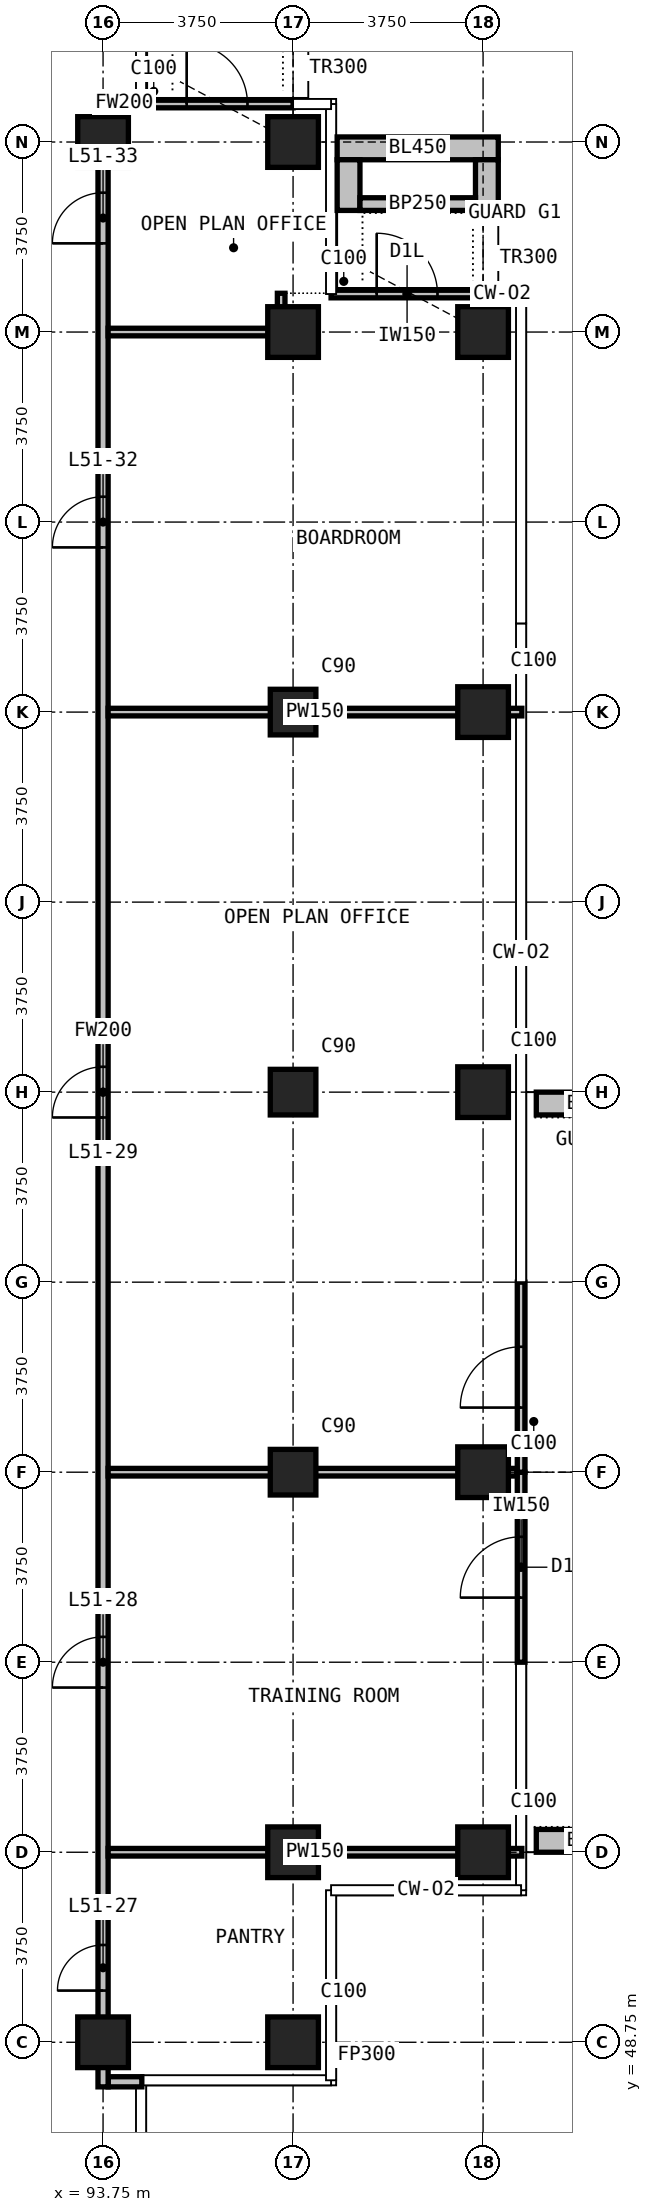
"""IFC4 building model, lengths in metres.
Left out: names, types, materials, properties, quantities, classifications, styles, units other than length and angle.
Written with IfcOpenShell. Run it as: python <this file> out.ifc"""

import sys

from ifc_helpers import new_model, si_unit, direction, frame, frame_2d, origin, origin_2d, place, context, subcontext, project, spatial, rectangle, extrude, element, fill, save


model = new_model("IFC4")
c1 = context("Model", 3, precision=1e-05, world=origin(), true_north=direction((0.0, 1.0)))
c2 = subcontext(c1, "Body", "Model", "MODEL_VIEW")
j1 = project(units=[si_unit("LENGTHUNIT", "METRE"), si_unit("PLANEANGLEUNIT", "RADIAN")], contexts=[c1])
p1 = place(None, origin())
s1 = spatial("IfcSite", under=j1, at=p1, CompositionType="ELEMENT")
p2 = place(p1, origin())
s2 = spatial("IfcBuilding", under=s1, at=p2, CompositionType="ELEMENT")
p3 = place(p2, frame((0.0, 0.0, 199.5)))
s3 = spatial("IfcBuildingStorey", under=s2, at=p3, CompositionType="ELEMENT", Elevation=199.5)
for number, where, z_axis, x_axis in (
    (1, (93.75, 48.75, 0.0), (0.0, 0.0, 1.0), (1.0, 0.0, 0.0)),
    (2, (93.75, 86.25, 0.0), (0.0, 0.0, 1.0), (1.0, 0.0, 0.0)),
    (3, (97.5, 48.75, 0.0), (0.0, 0.0, 1.0), (1.0, 0.0, 0.0)),
    (4, (97.5, 52.5, 0.0), (0.0, 0.0, 1.0), (1.0, 0.0, 0.0)),
):
    element("IfcColumn", number, at=place(p3, frame(where, z_axis=z_axis, x_axis=x_axis)), inside=s3, PredefinedType="COLUMN", context=c2, shape_type="SweptSolid", body=[
        extrude(rectangle(XDim=1.0, YDim=1.0, at=origin_2d()), origin(), (0.0, 0.0, 1.0), 3.6),
    ])
for number, where, z_axis, x_axis in (
    (5, (97.5, 60.0, 0.0), (0.0, 0.0, 1.0), (1.0, 0.0, 0.0)),
    (6, (97.5, 67.5, 0.0), (0.0, 0.0, 1.0), (1.0, 0.0, 0.0)),
    (7, (97.5, 75.0, 0.0), (0.0, 0.0, 1.0), (1.0, 0.0, 0.0)),
):
    element("IfcColumn", number, at=place(p3, frame(where, z_axis=z_axis, x_axis=x_axis)), inside=s3, PredefinedType="COLUMN", context=c2, shape_type="SweptSolid", body=[
        extrude(rectangle(XDim=0.9, YDim=0.9, at=origin_2d()), origin(), (0.0, 0.0, 1.0), 3.6),
    ])
for number, where, z_axis, x_axis in (
    (8, (97.5, 82.5, 0.0), (0.0, 0.0, 1.0), (1.0, 0.0, 0.0)),
    (9, (97.5, 86.25, 0.0), (0.0, 0.0, 1.0), (1.0, 0.0, 0.0)),
    (10, (101.25, 52.5, 0.0), (0.0, 0.0, 1.0), (1.0, 0.0, 0.0)),
    (11, (101.25, 60.0, 0.0), (0.0, 0.0, 1.0), (1.0, 0.0, 0.0)),
    (12, (101.25, 67.5, 0.0), (0.0, 0.0, 1.0), (1.0, 0.0, 0.0)),
    (13, (101.25, 75.0, 0.0), (0.0, 0.0, 1.0), (1.0, 0.0, 0.0)),
    (14, (101.25, 82.5, 0.0), (0.0, 0.0, 1.0), (1.0, 0.0, 0.0)),
):
    element("IfcColumn", number, at=place(p3, frame(where, z_axis=z_axis, x_axis=x_axis)), inside=s3, PredefinedType="COLUMN", context=c2, shape_type="SweptSolid", body=[
        extrude(rectangle(XDim=1.0, YDim=1.0, at=origin_2d()), origin(), (0.0, 0.0, 1.0), 3.6),
    ])
p4 = place(p3, frame((102.0, 56.25, 0.0), z_axis=(0.0, 0.0, 1.0), x_axis=(0.0, 1.0, 0.0)))
e15 = element("IfcWall", 15, at=p4, inside=s3, PredefinedType="SOLIDWALL", context=c2, shape_type="SweptSolid", body=[
    extrude(rectangle(XDim=3.75, YDim=0.15, at=frame_2d((1.875, 0.0))), origin(), (0.0, 0.0, 1.0), 3.3),
])
p5 = place(p4, frame((1.275, 0.0, 0.0)))
e16 = element("IfcOpeningElement", 16, at=p5, cuts=e15, PredefinedType="OPENING", context=c2, shape_type="SweptSolid", body=[
    extrude(rectangle(XDim=1.2, YDim=2.4, at=frame_2d((0.6, 1.2))), frame((0.0, 0.085, 0.0), z_axis=(0.0, -1.0, 0.0), x_axis=(1.0, 0.0, 0.0)), (0.0, 0.0, 1.0), 0.17),
])
p6 = place(p3, frame((102.0, 60.0, 0.0), z_axis=(0.0, 0.0, 1.0), x_axis=(0.0, 1.0, 0.0)))
e17 = element("IfcWall", 17, at=p6, inside=s3, PredefinedType="SOLIDWALL", context=c2, shape_type="SweptSolid", body=[
    extrude(rectangle(XDim=3.75, YDim=0.15, at=frame_2d((1.875, 0.0))), origin(), (0.0, 0.0, 1.0), 3.3),
])
p7 = place(p6, frame((1.275, 0.0, 0.0)))
e18 = element("IfcOpeningElement", 18, at=p7, cuts=e17, PredefinedType="OPENING", context=c2, shape_type="SweptSolid", body=[
    extrude(rectangle(XDim=1.2, YDim=2.4, at=frame_2d((0.6, 1.2))), frame((0.0, 0.085, 0.0), z_axis=(0.0, -1.0, 0.0), x_axis=(1.0, 0.0, 0.0)), (0.0, 0.0, 1.0), 0.17),
])
p8 = place(p3, frame((98.25, 83.25, 0.0), z_axis=(0.0, 0.0, 1.0), x_axis=(1.0, 0.0, 0.0)))
e19 = element("IfcWall", 19, at=p8, inside=s3, PredefinedType="SOLIDWALL", context=c2, shape_type="SweptSolid", body=[
    extrude(rectangle(XDim=3.0, YDim=0.15, at=frame_2d((1.5, 0.0))), origin(), (0.0, 0.0, 1.0), 3.3),
])
p9 = place(p8, frame((0.9, 0.0, 0.0)))
e20 = element("IfcOpeningElement", 20, at=p9, cuts=e19, PredefinedType="OPENING", context=c2, shape_type="SweptSolid", body=[
    extrude(rectangle(XDim=1.2, YDim=2.0, at=frame_2d((0.6, 1.0))), frame((0.0, 0.085, 0.0), z_axis=(0.0, -1.0, 0.0), x_axis=(1.0, 0.0, 0.0)), (0.0, 0.0, 1.0), 0.17),
])
p10 = place(p3, frame((94.5, 87.0, 0.0), z_axis=(0.0, 0.0, 1.0), x_axis=(1.0, 0.0, 0.0)))
e21 = element("IfcWall", 21, at=p10, inside=s3, PredefinedType="SOLIDWALL", context=c2, shape_type="SweptSolid", body=[
    extrude(rectangle(XDim=3.0, YDim=0.15, at=frame_2d((1.5, 0.0))), origin(), (0.0, 0.0, 1.0), 3.3),
])
p11 = place(p10, frame((0.9, 0.0, 0.0)))
e22 = element("IfcOpeningElement", 22, at=p11, cuts=e21, PredefinedType="OPENING", context=c2, shape_type="SweptSolid", body=[
    extrude(rectangle(XDim=1.2, YDim=2.0, at=frame_2d((0.6, 1.0))), frame((0.0, 0.085, 0.0), z_axis=(0.0, -1.0, 0.0), x_axis=(1.0, 0.0, 0.0)), (0.0, 0.0, 1.0), 0.17),
])
for number, where, z_axis, x_axis in (
    (23, (102.3, 52.725, 0.0), (0.0, 0.0, 1.0), (1.0, 0.0, 0.0)),
    (24, (102.3, 67.275, 0.0), (0.0, 0.0, 1.0), (1.0, 0.0, 0.0)),
):
    element("IfcWall", number, at=place(p3, frame(where, z_axis=z_axis, x_axis=x_axis)), inside=s3, PredefinedType="USERDEFINED", context=c2, shape_type="SweptSolid", body=[
        extrude(rectangle(XDim=2.35, YDim=0.45, at=frame_2d((1.175, 0.0))), origin(), (0.0, 0.0, 1.0), 1.1),
    ])
p12 = place(p3, frame((98.37, 86.125, 0.0), z_axis=(0.0, 0.0, 1.0), x_axis=(1.0, 0.0, 0.0)))
e25 = element("IfcWall", 25, at=p12, inside=s3, PredefinedType="USERDEFINED", context=c2, shape_type="SweptSolid", body=[
    extrude(rectangle(XDim=3.18, YDim=0.45, at=frame_2d((1.59, 0.0))), origin(), (0.0, 0.0, 1.0), 1.1),
])
for number, where, z_axis, x_axis in (
    (26, (98.595, 84.9, 0.0), (0.0, 0.0, 1.0), (0.0, 1.0, 0.0)),
    (27, (101.325, 84.9, 0.0), (0.0, 0.0, 1.0), (0.0, 1.0, 0.0)),
):
    element("IfcWall", number, at=place(p3, frame(where, z_axis=z_axis, x_axis=x_axis)), inside=s3, PredefinedType="USERDEFINED", context=c2, shape_type="SweptSolid", body=[
        extrude(rectangle(XDim=1.0, YDim=0.45, at=frame_2d((0.5, 0.0))), origin(), (0.0, 0.0, 1.0), 1.1),
    ])
p13 = place(p3, frame((98.82, 85.025, 0.0), z_axis=(0.0, 0.0, 1.0), x_axis=(1.0, 0.0, 0.0)))
e28 = element("IfcWall", 28, at=p13, inside=s3, PredefinedType="USERDEFINED", context=c2, shape_type="SweptSolid", body=[
    extrude(rectangle(XDim=2.28, YDim=0.25, at=frame_2d((1.14, 0.0))), origin(), (0.0, 0.0, 1.0), 1.0),
])
p14 = place(p3, frame((93.85, 47.97, 0.0), z_axis=(0.0, 0.0, 1.0), x_axis=(1.0, 0.0, 0.0)))
e29 = element("IfcWall", 29, at=p14, inside=s3, PredefinedType="PARTITIONING", context=c2, shape_type="SweptSolid", body=[
    extrude(rectangle(XDim=0.665, YDim=0.2, at=frame_2d((0.333, 0.0))), origin(), (0.0, 0.0, 1.0), 3.3),
])
p15 = place(p3, frame((93.85, 87.03, 0.0), z_axis=(0.0, 0.0, 1.0), x_axis=(1.0, 0.0, 0.0)))
e30 = element("IfcWall", 30, at=p15, inside=s3, PredefinedType="PARTITIONING", context=c2, shape_type="SweptSolid", body=[
    extrude(rectangle(XDim=0.64, YDim=0.2, at=frame_2d((0.32, 0.0))), origin(), (0.0, 0.0, 1.0), 3.3),
])
p16 = place(p3, frame((93.75, 47.87, 0.0), z_axis=(0.0, 0.0, 1.0), x_axis=(0.0, 1.0, 0.0)))
e31 = element("IfcWall", 31, at=p16, inside=s3, PredefinedType="PARTITIONING", context=c2, shape_type="SweptSolid", body=[
    extrude(rectangle(XDim=39.26, YDim=0.2, at=frame_2d((19.63, 0.0))), origin(), (0.0, 0.0, 1.0), 3.3),
])
p17 = place(p16, frame((1.9, 0.0, 0.0)))
e32 = element("IfcOpeningElement", 32, at=p17, cuts=e31, PredefinedType="OPENING", context=c2, shape_type="SweptSolid", body=[
    extrude(rectangle(XDim=0.9, YDim=2.2, at=frame_2d((0.45, 1.1))), frame((0.0, 0.11, 0.0), z_axis=(0.0, -1.0, 0.0), x_axis=(1.0, 0.0, 0.0)), (0.0, 0.0, 1.0), 0.22),
])
p18 = place(p16, frame((7.88, 0.0, 0.0)))
e33 = element("IfcOpeningElement", 33, at=p18, cuts=e31, PredefinedType="OPENING", context=c2, shape_type="SweptSolid", body=[
    extrude(rectangle(XDim=1.0, YDim=2.2, at=frame_2d((0.5, 1.1))), frame((0.0, 0.11, 0.0), z_axis=(0.0, -1.0, 0.0), x_axis=(1.0, 0.0, 0.0)), (0.0, 0.0, 1.0), 0.22),
])
p19 = place(p16, frame((19.13, 0.0, 0.0)))
e34 = element("IfcOpeningElement", 34, at=p19, cuts=e31, PredefinedType="OPENING", context=c2, shape_type="SweptSolid", body=[
    extrude(rectangle(XDim=1.0, YDim=2.2, at=frame_2d((0.5, 1.1))), frame((0.0, 0.11, 0.0), z_axis=(0.0, -1.0, 0.0), x_axis=(1.0, 0.0, 0.0)), (0.0, 0.0, 1.0), 0.22),
])
p20 = place(p16, frame((30.38, 0.0, 0.0)))
e35 = element("IfcOpeningElement", 35, at=p20, cuts=e31, PredefinedType="OPENING", context=c2, shape_type="SweptSolid", body=[
    extrude(rectangle(XDim=1.0, YDim=2.2, at=frame_2d((0.5, 1.1))), frame((0.0, 0.11, 0.0), z_axis=(0.0, -1.0, 0.0), x_axis=(1.0, 0.0, 0.0)), (0.0, 0.0, 1.0), 0.22),
])
p21 = place(p16, frame((36.38, 0.0, 0.0)))
e36 = element("IfcOpeningElement", 36, at=p21, cuts=e31, PredefinedType="OPENING", context=c2, shape_type="SweptSolid", body=[
    extrude(rectangle(XDim=1.0, YDim=2.2, at=frame_2d((0.5, 1.1))), frame((0.0, 0.11, 0.0), z_axis=(0.0, -1.0, 0.0), x_axis=(1.0, 0.0, 0.0)), (0.0, 0.0, 1.0), 0.22),
])
p22 = place(p3, frame((93.85, 52.5, 0.0), z_axis=(0.0, 0.0, 1.0), x_axis=(1.0, 0.0, 0.0)))
e37 = element("IfcWall", 37, at=p22, inside=s3, PredefinedType="PARTITIONING", context=c2, shape_type="SweptSolid", body=[
    extrude(rectangle(XDim=8.165, YDim=0.15, at=frame_2d((4.083, 0.0))), origin(), (0.0, 0.0, 1.0), 3.3),
])
p23 = place(p3, frame((93.85, 60.0, 0.0), z_axis=(0.0, 0.0, 1.0), x_axis=(1.0, 0.0, 0.0)))
e38 = element("IfcWall", 38, at=p23, inside=s3, PredefinedType="PARTITIONING", context=c2, shape_type="SweptSolid", body=[
    extrude(rectangle(XDim=8.065, YDim=0.15, at=frame_2d((4.032, 0.0))), origin(), (0.0, 0.0, 1.0), 3.3),
])
p24 = place(p3, frame((93.85, 75.0, 0.0), z_axis=(0.0, 0.0, 1.0), x_axis=(1.0, 0.0, 0.0)))
e39 = element("IfcWall", 39, at=p24, inside=s3, PredefinedType="PARTITIONING", context=c2, shape_type="SweptSolid", body=[
    extrude(rectangle(XDim=8.165, YDim=0.15, at=frame_2d((4.083, 0.0))), origin(), (0.0, 0.0, 1.0), 3.3),
])
p25 = place(p3, frame((93.85, 82.5, 0.0), z_axis=(0.0, 0.0, 1.0), x_axis=(1.0, 0.0, 0.0)))
e40 = element("IfcWall", 40, at=p25, inside=s3, PredefinedType="PARTITIONING", context=c2, shape_type="SweptSolid", body=[
    extrude(rectangle(XDim=3.34, YDim=0.15, at=frame_2d((1.67, 0.0))), origin(), (0.0, 0.0, 1.0), 3.3),
])
p26 = place(p3, frame((97.265, 82.425, 0.0), z_axis=(0.0, 0.0, 1.0), x_axis=(0.0, 1.0, 0.0)))
e41 = element("IfcWall", 41, at=p26, inside=s3, PredefinedType="PARTITIONING", context=c2, shape_type="SweptSolid", body=[
    extrude(rectangle(XDim=0.84, YDim=0.15, at=frame_2d((0.42, 0.0))), origin(), (0.0, 0.0, 1.0), 3.3),
])
p27 = place(p5, origin())
e42 = element("IfcDoor", 42, at=p27, inside=s3, OperationType="SINGLE_SWING_LEFT", PredefinedType="DOOR", context=c2, shape_type="SweptSolid", body=[
    extrude(rectangle(XDim=1.2, YDim=2.4, at=frame_2d((0.6, 1.2))), frame((0.0, 0.025, 0.0), z_axis=(0.0, -1.0, 0.0), x_axis=(1.0, 0.0, 0.0)), (0.0, 0.0, 1.0), 0.05),
])
fill(e16, e42)
p28 = place(p7, origin())
e43 = element("IfcDoor", 43, at=p28, inside=s3, OperationType="SINGLE_SWING_LEFT", PredefinedType="DOOR", context=c2, shape_type="SweptSolid", body=[
    extrude(rectangle(XDim=1.2, YDim=2.4, at=frame_2d((0.6, 1.2))), frame((0.0, 0.025, 0.0), z_axis=(0.0, -1.0, 0.0), x_axis=(1.0, 0.0, 0.0)), (0.0, 0.0, 1.0), 0.05),
])
fill(e18, e43)
p29 = place(p9, origin())
e44 = element("IfcDoor", 44, at=p29, inside=s3, OperationType="SINGLE_SWING_LEFT", PredefinedType="DOOR", context=c2, shape_type="SweptSolid", body=[
    extrude(rectangle(XDim=1.2, YDim=2.0, at=frame_2d((0.6, 1.0))), frame((0.0, 0.025, 0.0), z_axis=(0.0, -1.0, 0.0), x_axis=(1.0, 0.0, 0.0)), (0.0, 0.0, 1.0), 0.05),
])
fill(e20, e44)
p30 = place(p11, origin())
e45 = element("IfcDoor", 45, at=p30, inside=s3, OperationType="SINGLE_SWING_LEFT", PredefinedType="DOOR", context=c2, shape_type="SweptSolid", body=[
    extrude(rectangle(XDim=1.2, YDim=2.0, at=frame_2d((0.6, 1.0))), frame((0.0, 0.025, 0.0), z_axis=(0.0, -1.0, 0.0), x_axis=(1.0, 0.0, 0.0)), (0.0, 0.0, 1.0), 0.05),
])
fill(e22, e45)
p31 = place(p17, origin())
e46 = element("IfcDoor", 46, at=p31, inside=s3, OperationType="SINGLE_SWING_RIGHT", PredefinedType="DOOR", context=c2, shape_type="SweptSolid", body=[
    extrude(rectangle(XDim=0.9, YDim=2.2, at=frame_2d((0.45, 1.1))), frame((0.0, 0.025, 0.0), z_axis=(0.0, -1.0, 0.0), x_axis=(1.0, 0.0, 0.0)), (0.0, 0.0, 1.0), 0.05),
])
fill(e32, e46)
p32 = place(p18, origin())
e47 = element("IfcDoor", 47, at=p32, inside=s3, OperationType="SINGLE_SWING_LEFT", PredefinedType="DOOR", context=c2, shape_type="SweptSolid", body=[
    extrude(rectangle(XDim=1.0, YDim=2.2, at=frame_2d((0.5, 1.1))), frame((0.0, 0.025, 0.0), z_axis=(0.0, -1.0, 0.0), x_axis=(1.0, 0.0, 0.0)), (0.0, 0.0, 1.0), 0.05),
])
fill(e33, e47)
p33 = place(p19, origin())
e48 = element("IfcDoor", 48, at=p33, inside=s3, OperationType="SINGLE_SWING_LEFT", PredefinedType="DOOR", context=c2, shape_type="SweptSolid", body=[
    extrude(rectangle(XDim=1.0, YDim=2.2, at=frame_2d((0.5, 1.1))), frame((0.0, 0.025, 0.0), z_axis=(0.0, -1.0, 0.0), x_axis=(1.0, 0.0, 0.0)), (0.0, 0.0, 1.0), 0.05),
])
fill(e34, e48)
p34 = place(p20, origin())
e49 = element("IfcDoor", 49, at=p34, inside=s3, OperationType="SINGLE_SWING_LEFT", PredefinedType="DOOR", context=c2, shape_type="SweptSolid", body=[
    extrude(rectangle(XDim=1.0, YDim=2.2, at=frame_2d((0.5, 1.1))), frame((0.0, 0.025, 0.0), z_axis=(0.0, -1.0, 0.0), x_axis=(1.0, 0.0, 0.0)), (0.0, 0.0, 1.0), 0.05),
])
fill(e35, e49)
p35 = place(p21, origin())
e50 = element("IfcDoor", 50, at=p35, inside=s3, OperationType="SINGLE_SWING_RIGHT", PredefinedType="DOOR", context=c2, shape_type="SweptSolid", body=[
    extrude(rectangle(XDim=1.0, YDim=2.2, at=frame_2d((0.5, 1.1))), frame((0.0, 0.025, 0.0), z_axis=(0.0, -1.0, 0.0), x_axis=(1.0, 0.0, 0.0)), (0.0, 0.0, 1.0), 0.05),
])
fill(e36, e50)
save(model, sys.argv[1])
